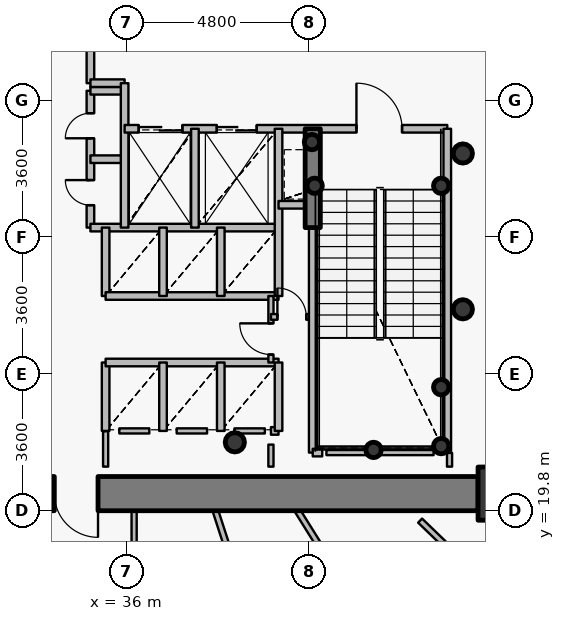
"""IFC4 building model, lengths in metres.
Left out: names, types, materials, properties, quantities, classifications, styles, units other than length and angle.
Written with IfcOpenShell. Run it as: python <this file> out.ifc"""

import sys

from ifc_helpers import new_model, si_unit, direction, frame, frame_2d, origin, origin_2d, place, context, subcontext, project, spatial, rectangle, hollow_circle, extrude, source, transform, mapped, element, fill, save


model = new_model("IFC4")
c1 = context("Model", 3, precision=1e-05, world=origin(), true_north=direction((0.0, 1.0)))
c2 = subcontext(c1, "Body", "Model", "MODEL_VIEW")
j1 = project(units=[si_unit("LENGTHUNIT", "METRE"), si_unit("PLANEANGLEUNIT", "RADIAN")], contexts=[c1])
p1 = place(None, origin())
s1 = spatial("IfcSite", under=j1, at=p1, CompositionType="ELEMENT")
p2 = place(p1, origin())
s2 = spatial("IfcBuilding", under=s1, at=p2, CompositionType="ELEMENT")
p3 = place(p2, frame((0.0, 0.0, 10.2)))
s3 = spatial("IfcBuildingStorey", under=s2, at=p3, CompositionType="ELEMENT", Elevation=10.2)
p4 = place(p3, frame((45.95, 20.25, 0.0), z_axis=(0.0, 0.0, 1.0), x_axis=(1.0, 0.0, 0.0)))
e1 = element("IfcColumn", 1, at=p4, inside=s3, PredefinedType="COLUMN", context=c2, shape_type="SweptSolid", body=[
    extrude(rectangle(XDim=1.4, YDim=1.4, at=origin_2d()), origin(), (0.0, 0.0, 1.0), 4.2),
])
p5 = place(p3, frame((38.85, 21.6, 0.0), z_axis=(0.0, 0.0, 1.0), x_axis=(1.0, 0.0, 0.0)))
e2 = element("IfcColumn", 2, at=p5, inside=s3, PredefinedType="COLUMN", context=c2, shape_type="SweptSolid", body=[
    extrude(hollow_circle(Radius=0.254, WallThickness=0.02, at=origin_2d()), origin(), (0.0, 0.0, 1.0), 4.2),
])
for number, where, z_axis, x_axis in (
    (3, (44.28, 21.5, 0.0), (0.0, 0.0, 1.0), (1.0, 0.0, 0.0)),
    (4, (44.28, 23.05, 0.0), (0.0, 0.0, 1.0), (1.0, 0.0, 0.0)),
    (5, (42.5, 21.4, 0.0), (0.0, 0.0, 1.0), (1.0, 0.0, 0.0)),
    (6, (40.95, 28.35, 0.0), (0.0, 0.0, 1.0), (1.0, 0.0, 0.0)),
    (7, (44.28, 28.35, 0.0), (0.0, 0.0, 1.0), (1.0, 0.0, 0.0)),
    (8, (40.88, 29.5, 0.0), (0.0, 0.0, 1.0), (1.0, 0.0, 0.0)),
):
    element("IfcColumn", number, at=place(p3, frame(where, z_axis=z_axis, x_axis=x_axis)), inside=s3, PredefinedType="COLUMN", context=c2, shape_type="SweptSolid", body=[
        extrude(hollow_circle(Radius=0.203, WallThickness=0.016, at=origin_2d()), origin(), (0.0, 0.0, 1.0), 4.2),
    ])
p6 = place(p3, frame((45.25, 20.25, 0.0), z_axis=(0.0, 0.0, 1.0), x_axis=(-1.0, 0.0, 0.0)))
e9 = element("IfcWall", 9, at=p6, inside=s3, PredefinedType="SHEAR", context=c2, shape_type="SweptSolid", body=[
    extrude(rectangle(XDim=18.5, YDim=0.9, at=frame_2d((9.25, 0.0))), origin(), (0.0, 0.0, 1.0), 3.35),
])
p7 = place(p6, frame((10.0, 0.0, 0.0)))
e10 = element("IfcOpeningElement", 10, at=p7, cuts=e9, PredefinedType="OPENING", context=c2, shape_type="SweptSolid", body=[
    extrude(rectangle(XDim=1.15, YDim=2.15, at=origin_2d()), frame((0.575, 0.46, 1.075), z_axis=(0.0, -1.0, 0.0), x_axis=(1.0, 0.0, 0.0)), (0.0, 0.0, 1.0), 0.92),
])
p8 = place(p3, frame((40.9, 27.25, 0.0), z_axis=(0.0, 0.0, 1.0), x_axis=(0.0, 1.0, 0.0)))
e11 = element("IfcWall", 11, at=p8, inside=s3, PredefinedType="SHEAR", context=c2, shape_type="SweptSolid", body=[
    extrude(rectangle(XDim=2.6, YDim=0.4, at=frame_2d((1.3, 0.0))), origin(), (0.0, 0.0, 1.0), 3.5),
])
for number, where, z_axis, x_axis in (
    (12, (44.85, 25.1, 0.0), (0.0, 0.0, 1.0), (1.0, 0.0, 0.0)),
    (13, (44.85, 29.2, 0.0), (0.0, 0.0, 1.0), (1.0, 0.0, 0.0)),
):
    element("IfcColumn", number, at=place(p3, frame(where, z_axis=z_axis, x_axis=x_axis)), inside=s3, PredefinedType="COLUMN", context=c2, shape_type="SweptSolid", body=[
        extrude(hollow_circle(Radius=0.254, WallThickness=0.02, at=origin_2d()), origin(), (0.0, 0.0, 1.0), 4.2),
    ])
p9 = place(p3, frame((35.05, 27.25, 0.0), z_axis=(0.0, 0.0, 1.0), x_axis=(0.0, 1.0, 0.0)))
e14 = element("IfcWall", 14, at=p9, inside=s3, PredefinedType="PARTITIONING", context=c2, shape_type="SweptSolid", body=[
    extrude(rectangle(XDim=3.6, YDim=0.2, at=frame_2d((1.8, 0.0))), origin(), (0.0, 0.0, 1.0), 3.9),
])
p10 = place(p9, frame((0.59, 0.0, 0.0)))
e15 = element("IfcOpeningElement", 15, at=p10, cuts=e14, PredefinedType="OPENING", context=c2, shape_type="SweptSolid", body=[
    extrude(rectangle(XDim=0.66, YDim=2.05, at=origin_2d()), frame((0.33, 0.11, 1.025), z_axis=(0.0, -1.0, 0.0), x_axis=(1.0, 0.0, 0.0)), (0.0, 0.0, 1.0), 0.22),
])
p11 = place(p9, frame((2.35, 0.0, 0.0)))
e16 = element("IfcOpeningElement", 16, at=p11, cuts=e14, PredefinedType="OPENING", context=c2, shape_type="SweptSolid", body=[
    extrude(rectangle(XDim=0.66, YDim=2.05, at=origin_2d()), frame((0.33, 0.11, 1.025), z_axis=(0.0, -1.0, 0.0), x_axis=(1.0, 0.0, 0.0)), (0.0, 0.0, 1.0), 0.22),
])
p12 = place(p3, frame((35.05, 27.25, 0.0), z_axis=(0.0, 0.0, 1.0), x_axis=(1.0, 0.0, 0.0)))
e17 = element("IfcWall", 17, at=p12, inside=s3, PredefinedType="PARTITIONING", context=c2, shape_type="SweptSolid", body=[
    extrude(rectangle(XDim=4.95, YDim=0.2, at=frame_2d((2.475, 0.0))), origin(), (0.0, 0.0, 1.0), 3.485),
])
for number, where, z_axis, x_axis in (
    (18, (35.05, 29.05, 0.0), (0.0, 0.0, 1.0), (1.0, 0.0, 0.0)),
    (19, (35.05, 30.85, 0.0), (0.0, 0.0, 1.0), (1.0, 0.0, 0.0)),
):
    element("IfcWall", number, at=place(p3, frame(where, z_axis=z_axis, x_axis=x_axis)), inside=s3, PredefinedType="PARTITIONING", context=c2, shape_type="SweptSolid", body=[
        extrude(rectangle(XDim=0.9, YDim=0.2, at=frame_2d((0.45, 0.0))), origin(), (0.0, 0.0, 1.0), 3.9),
    ])
p13 = place(p3, frame((35.05, 31.05, 0.0), z_axis=(0.0, 0.0, 1.0), x_axis=(0.0, 1.0, 0.0)))
e20 = element("IfcWall", 20, at=p13, inside=s3, PredefinedType="PARTITIONING", context=c2, shape_type="SweptSolid", body=[
    extrude(rectangle(XDim=2.25, YDim=0.2, at=frame_2d((1.125, 0.0))), origin(), (0.0, 0.0, 1.0), 3.485),
])
p14 = place(p3, frame((35.05, 31.05, 0.0), z_axis=(0.0, 0.0, 1.0), x_axis=(1.0, 0.0, 0.0)))
e21 = element("IfcWall", 21, at=p14, inside=s3, PredefinedType="PARTITIONING", context=c2, shape_type="SweptSolid", body=[
    extrude(rectangle(XDim=0.9, YDim=0.2, at=frame_2d((0.45, 0.0))), origin(), (0.0, 0.0, 1.0), 3.9),
])
p15 = place(p3, frame((35.45, 21.9, 0.0), z_axis=(0.0, 0.0, 1.0), x_axis=(0.0, 1.0, 0.0)))
e22 = element("IfcWall", 22, at=p15, inside=s3, PredefinedType="PARTITIONING", context=c2, shape_type="SweptSolid", body=[
    extrude(rectangle(XDim=1.8, YDim=0.2, at=frame_2d((0.9, 0.0))), origin(), (0.0, 0.0, 1.0), 3.9),
])
p16 = place(p3, frame((35.45, 23.7, 0.0), z_axis=(0.0, 0.0, 1.0), x_axis=(1.0, 0.0, 0.0)))
e23 = element("IfcWall", 23, at=p16, inside=s3, PredefinedType="PARTITIONING", context=c2, shape_type="SweptSolid", body=[
    extrude(rectangle(XDim=4.55, YDim=0.2, at=frame_2d((2.275, 0.0))), origin(), (0.0, 0.0, 1.0), 3.485),
])
p17 = place(p3, frame((35.45, 25.45, 0.0), z_axis=(0.0, 0.0, 1.0), x_axis=(0.0, 1.0, 0.0)))
e24 = element("IfcWall", 24, at=p17, inside=s3, PredefinedType="PARTITIONING", context=c2, shape_type="SweptSolid", body=[
    extrude(rectangle(XDim=1.8, YDim=0.2, at=frame_2d((0.9, 0.0))), origin(), (0.0, 0.0, 1.0), 3.9),
])
p18 = place(p3, frame((35.45, 25.45, 0.0), z_axis=(0.0, 0.0, 1.0), x_axis=(1.0, 0.0, 0.0)))
e25 = element("IfcWall", 25, at=p18, inside=s3, PredefinedType="PARTITIONING", context=c2, shape_type="SweptSolid", body=[
    extrude(rectangle(XDim=4.55, YDim=0.2, at=frame_2d((2.275, 0.0))), origin(), (0.0, 0.0, 1.0), 3.485),
])
p19 = place(p3, frame((35.95, 27.25, 0.0), z_axis=(0.0, 0.0, 1.0), x_axis=(0.0, 1.0, 0.0)))
e26 = element("IfcWall", 26, at=p19, inside=s3, PredefinedType="PARTITIONING", context=c2, shape_type="SweptSolid", body=[
    extrude(rectangle(XDim=3.8, YDim=0.2, at=frame_2d((1.9, 0.0))), origin(), (0.0, 0.0, 1.0), 3.9),
])
p20 = place(p3, frame((35.95, 29.85, 0.0), z_axis=(0.0, 0.0, 1.0), x_axis=(1.0, 0.0, 0.0)))
e27 = element("IfcWall", 27, at=p20, inside=s3, PredefinedType="PARTITIONING", context=c2, shape_type="SweptSolid", body=[
    extrude(rectangle(XDim=8.49, YDim=0.2, at=frame_2d((4.245, 0.0))), origin(), (0.0, 0.0, 1.0), 3.485),
])
p21 = place(p20, frame((6.1, 0.0, 0.0)))
e28 = element("IfcOpeningElement", 28, at=p21, cuts=e27, PredefinedType="OPENING", context=c2, shape_type="SweptSolid", body=[
    extrude(rectangle(XDim=1.2, YDim=2.15, at=origin_2d()), frame((0.6, 0.11, 1.075), z_axis=(0.0, -1.0, 0.0), x_axis=(1.0, 0.0, 0.0)), (0.0, 0.0, 1.0), 0.22),
])
p22 = place(p20, frame((0.37, 0.0, 0.0)))
e29 = element("IfcOpeningElement", 29, at=p22, cuts=e27, PredefinedType="OPENING", context=c2, shape_type="SweptSolid", body=[
    extrude(rectangle(XDim=1.15, YDim=2.15, at=origin_2d()), frame((0.575, 0.11, 1.075), z_axis=(0.0, -1.0, 0.0), x_axis=(1.0, 0.0, 0.0)), (0.0, 0.0, 1.0), 0.22),
])
p23 = place(p20, frame((2.425, 0.0, 0.0)))
e30 = element("IfcOpeningElement", 30, at=p23, cuts=e27, PredefinedType="OPENING", context=c2, shape_type="SweptSolid", body=[
    extrude(rectangle(XDim=1.05, YDim=2.15, at=origin_2d()), frame((0.525, 0.11, 1.075), z_axis=(0.0, -1.0, 0.0), x_axis=(1.0, 0.0, 0.0)), (0.0, 0.0, 1.0), 0.22),
])
p24 = place(p3, frame((36.2, 17.9, 0.0), z_axis=(0.0, 0.0, 1.0), x_axis=(0.0, 1.0, 0.0)))
e31 = element("IfcWall", 31, at=p24, inside=s3, PredefinedType="PARTITIONING", context=c2, shape_type="SweptSolid", body=[
    extrude(rectangle(XDim=1.9, YDim=0.135, at=frame_2d((0.95, 0.0))), origin(), (0.0, 0.0, 1.0), 3.085),
])
for number, where, z_axis, x_axis in (
    (32, (36.96, 21.9, 0.0), (0.0, 0.0, 1.0), (0.0, 1.0, 0.0)),
    (33, (36.96, 25.45, 0.0), (0.0, 0.0, 1.0), (0.0, 1.0, 0.0)),
):
    element("IfcWall", number, at=place(p3, frame(where, z_axis=z_axis, x_axis=x_axis)), inside=s3, PredefinedType="PARTITIONING", context=c2, shape_type="SweptSolid", body=[
        extrude(rectangle(XDim=1.8, YDim=0.2, at=frame_2d((0.9, 0.0))), origin(), (0.0, 0.0, 1.0), 3.9),
    ])
p25 = place(p3, frame((37.8, 27.25, 0.0), z_axis=(0.0, 0.0, 1.0), x_axis=(0.0, 1.0, 0.0)))
e34 = element("IfcWall", 34, at=p25, inside=s3, PredefinedType="PARTITIONING", context=c2, shape_type="SweptSolid", body=[
    extrude(rectangle(XDim=2.6, YDim=0.2, at=frame_2d((1.3, 0.0))), origin(), (0.0, 0.0, 1.0), 3.9),
])
p26 = place(p3, frame((38.339, 19.8, 0.0), z_axis=(0.0, 0.0, 1.0), x_axis=(0.309020911431, -0.951055243557, 0.0)))
e35 = element("IfcWall", 35, at=p26, inside=s3, PredefinedType="PARTITIONING", context=c2, shape_type="SweptSolid", body=[
    extrude(rectangle(XDim=18.723, YDim=0.15, at=frame_2d((9.362, 0.0))), origin(), (0.0, 0.0, 1.0), 3.285),
])
p27 = place(p26, frame((4.76, 0.0, 0.0)))
e36 = element("IfcOpeningElement", 36, at=p27, cuts=e35, PredefinedType="OPENING", context=c2, shape_type="SweptSolid", body=[
    extrude(rectangle(XDim=0.82, YDim=2.1, at=origin_2d()), frame((0.41, 0.085, 1.05), z_axis=(0.0, -1.0, 0.0), x_axis=(1.0, 0.0, 0.0)), (0.0, 0.0, 1.0), 0.17),
])
p28 = place(p26, frame((13.966, 0.0, 0.0)))
e37 = element("IfcOpeningElement", 37, at=p28, cuts=e35, PredefinedType="OPENING", context=c2, shape_type="SweptSolid", body=[
    extrude(rectangle(XDim=1.05, YDim=2.15, at=origin_2d()), frame((0.525, 0.085, 1.075), z_axis=(0.0, -1.0, 0.0), x_axis=(1.0, 0.0, 0.0)), (0.0, 0.0, 1.0), 0.17),
])
for number, where, z_axis, x_axis in (
    (38, (38.48, 21.9, 0.0), (0.0, 0.0, 1.0), (0.0, 1.0, 0.0)),
    (39, (38.48, 25.45, 0.0), (0.0, 0.0, 1.0), (0.0, 1.0, 0.0)),
):
    element("IfcWall", number, at=place(p3, frame(where, z_axis=z_axis, x_axis=x_axis)), inside=s3, PredefinedType="PARTITIONING", context=c2, shape_type="SweptSolid", body=[
        extrude(rectangle(XDim=1.8, YDim=0.2, at=frame_2d((0.9, 0.0))), origin(), (0.0, 0.0, 1.0), 3.9),
    ])
p29 = place(p3, frame((39.8, 21.9, 0.0), z_axis=(0.0, 0.0, 1.0), x_axis=(1.0, 0.0, 0.0)))
e40 = element("IfcWall", 40, at=p29, inside=s3, PredefinedType="PARTITIONING", context=c2, shape_type="SweptSolid", body=[
    extrude(rectangle(XDim=0.2, YDim=0.2, at=frame_2d((0.1, 0.0))), origin(), (0.0, 0.0, 1.0), 3.9),
])
p30 = place(p3, frame((39.8, 23.7, 0.0), z_axis=(0.0, 0.0, 1.0), x_axis=(0.0, 1.0, 0.0)))
e41 = element("IfcWall", 41, at=p30, inside=s3, PredefinedType="PARTITIONING", context=c2, shape_type="SweptSolid", body=[
    extrude(rectangle(XDim=1.75, YDim=0.135, at=frame_2d((0.875, 0.0))), origin(), (0.0, 0.0, 1.0), 3.9),
])
p31 = place(p30, frame((0.21, 0.0, 0.0)))
e42 = element("IfcOpeningElement", 42, at=p31, cuts=e41, PredefinedType="OPENING", context=c2, shape_type="SweptSolid", body=[
    extrude(rectangle(XDim=0.82, YDim=2.1, at=origin_2d()), frame((0.41, 0.078, 1.05), z_axis=(0.0, -1.0, 0.0), x_axis=(1.0, 0.0, 0.0)), (0.0, 0.0, 1.0), 0.155),
])
p32 = place(p3, frame((39.8, 24.9, 0.0), z_axis=(0.0, 0.0, 1.0), x_axis=(1.0, 0.0, 0.0)))
e43 = element("IfcWall", 43, at=p32, inside=s3, PredefinedType="PARTITIONING", context=c2, shape_type="SweptSolid", body=[
    extrude(rectangle(XDim=1.1, YDim=0.15, at=frame_2d((0.55, 0.0))), origin(), (0.0, 0.0, 1.0), 3.9),
])
p33 = place(p32, frame((0.17, 0.0, 0.0)))
e44 = element("IfcOpeningElement", 44, at=p33, cuts=e43, PredefinedType="OPENING", context=c2, shape_type="SweptSolid", body=[
    extrude(rectangle(XDim=0.76, YDim=2.1, at=origin_2d()), frame((0.38, 0.085, 1.05), z_axis=(0.0, -1.0, 0.0), x_axis=(1.0, 0.0, 0.0)), (0.0, 0.0, 1.0), 0.17),
])
p34 = place(p3, frame((40.0, 21.9, 0.0), z_axis=(0.0, 0.0, 1.0), x_axis=(0.0, 1.0, 0.0)))
e45 = element("IfcWall", 45, at=p34, inside=s3, PredefinedType="PARTITIONING", context=c2, shape_type="SweptSolid", body=[
    extrude(rectangle(XDim=1.8, YDim=0.2, at=frame_2d((0.9, 0.0))), origin(), (0.0, 0.0, 1.0), 3.9),
])
p35 = place(p3, frame((40.0, 25.45, 0.0), z_axis=(0.0, 0.0, 1.0), x_axis=(0.0, 1.0, 0.0)))
e46 = element("IfcWall", 46, at=p35, inside=s3, PredefinedType="PARTITIONING", context=c2, shape_type="SweptSolid", body=[
    extrude(rectangle(XDim=4.4, YDim=0.2, at=frame_2d((2.2, 0.0))), origin(), (0.0, 0.0, 1.0), 3.9),
])
p36 = place(p3, frame((40.0, 27.85, 0.0), z_axis=(0.0, 0.0, 1.0), x_axis=(1.0, 0.0, 0.0)))
e47 = element("IfcWall", 47, at=p36, inside=s3, PredefinedType="PARTITIONING", context=c2, shape_type="SweptSolid", body=[
    extrude(rectangle(XDim=0.9, YDim=0.2, at=frame_2d((0.45, 0.0))), origin(), (0.0, 0.0, 1.0), 3.9),
])
p37 = place(p3, frame((40.499, 19.8, 0.0), z_axis=(0.0, 0.0, 1.0), x_axis=(0.529919953547, -0.848047665425, 0.0)))
e48 = element("IfcWall", 48, at=p37, inside=s3, PredefinedType="PARTITIONING", context=c2, shape_type="SweptSolid", body=[
    extrude(rectangle(XDim=18.893, YDim=0.15, at=frame_2d((9.447, 0.0))), origin(), (0.0, 0.0, 1.0), 3.285),
])
p38 = place(p37, frame((13.906, 0.0, 0.0)))
e49 = element("IfcOpeningElement", 49, at=p38, cuts=e48, PredefinedType="OPENING", context=c2, shape_type="SweptSolid", body=[
    extrude(rectangle(XDim=1.05, YDim=2.15, at=origin_2d()), frame((0.525, 0.085, 1.075), z_axis=(0.0, -1.0, 0.0), x_axis=(1.0, 0.0, 0.0)), (0.0, 0.0, 1.0), 0.17),
])
p39 = place(p3, frame((40.9, 21.33, 0.0), z_axis=(0.0, 0.0, 1.0), x_axis=(0.0, 1.0, 0.0)))
e50 = element("IfcWall", 50, at=p39, inside=s3, PredefinedType="PARTITIONING", context=c2, shape_type="SweptSolid", body=[
    extrude(rectangle(XDim=5.91, YDim=0.2, at=frame_2d((2.955, 0.0))), origin(), (0.0, 0.0, 1.0), 3.435),
])
p40 = place(p3, frame((40.9, 21.33, 0.0), z_axis=(0.0, 0.0, 1.0), x_axis=(1.0, 0.0, 0.0)))
e51 = element("IfcWall", 51, at=p40, inside=s3, PredefinedType="PARTITIONING", context=c2, shape_type="SweptSolid", body=[
    extrude(rectangle(XDim=0.25, YDim=0.2, at=frame_2d((0.125, 0.0))), origin(), (0.0, 0.0, 1.0), 3.435),
])
p41 = place(p3, frame((44.44, 21.33, 0.0), z_axis=(0.0, 0.0, 1.0), x_axis=(0.0, 1.0, 0.0)))
e52 = element("IfcWall", 52, at=p41, inside=s3, PredefinedType="PARTITIONING", context=c2, shape_type="SweptSolid", body=[
    extrude(rectangle(XDim=8.52, YDim=0.2, at=frame_2d((4.26, 0.0))), origin(), (0.0, 0.0, 1.0), 3.9),
])
p42 = place(p3, frame((44.08, 21.33, 0.0), z_axis=(0.0, 0.0, 1.0), x_axis=(-1.0, 0.0, 0.0)))
e53 = element("IfcWall", 53, at=p42, inside=s3, PredefinedType="PARTITIONING", context=c2, shape_type="SweptSolid", body=[
    extrude(rectangle(XDim=2.82, YDim=0.135, at=frame_2d((1.41, 0.0))), origin(), (0.0, 0.0, 1.0), 3.435),
])
p43 = place(p3, frame((36.6, 21.9, 0.0), z_axis=(0.0, 0.0, 1.0), x_axis=(-1.0, 0.0, 0.0)))
e54 = element("IfcWall", 54, at=p43, inside=s3, PredefinedType="PARTITIONING", context=c2, shape_type="SweptSolid", body=[
    extrude(rectangle(XDim=0.79, YDim=0.135, at=frame_2d((0.395, 0.0))), origin(), (0.0, 0.0, 1.0), 3.9),
])
p44 = place(p3, frame((38.12, 21.9, 0.0), z_axis=(0.0, 0.0, 1.0), x_axis=(-1.0, 0.0, 0.0)))
e55 = element("IfcWall", 55, at=p44, inside=s3, PredefinedType="PARTITIONING", context=c2, shape_type="SweptSolid", body=[
    extrude(rectangle(XDim=0.8, YDim=0.135, at=frame_2d((0.4, 0.0))), origin(), (0.0, 0.0, 1.0), 3.9),
])
p45 = place(p3, frame((39.64, 21.9, 0.0), z_axis=(0.0, 0.0, 1.0), x_axis=(-1.0, 0.0, 0.0)))
e56 = element("IfcWall", 56, at=p45, inside=s3, PredefinedType="PARTITIONING", context=c2, shape_type="SweptSolid", body=[
    extrude(rectangle(XDim=0.8, YDim=0.135, at=frame_2d((0.4, 0.0))), origin(), (0.0, 0.0, 1.0), 3.485),
])
p46 = place(p3, frame((39.8, 20.96, 0.0), z_axis=(0.0, 0.0, 1.0), x_axis=(0.0, 1.0, 0.0)))
e57 = element("IfcWall", 57, at=p46, inside=s3, PredefinedType="PARTITIONING", context=c2, shape_type="SweptSolid", body=[
    extrude(rectangle(XDim=0.58, YDim=0.135, at=frame_2d((0.29, 0.0))), origin(), (0.0, 0.0, 1.0), 3.435),
])
p47 = place(p3, frame((44.5, 20.96, 0.0), z_axis=(0.0, 0.0, 1.0), x_axis=(0.0, 1.0, 0.0)))
e58 = element("IfcWall", 58, at=p47, inside=s3, PredefinedType="PARTITIONING", context=c2, shape_type="SweptSolid", body=[
    extrude(rectangle(XDim=0.36, YDim=0.135, at=frame_2d((0.18, 0.0))), origin(), (0.0, 0.0, 1.0), 3.9),
])
p48 = place(p3, frame((35.45, 21.89, 0.0), z_axis=(0.0, 0.0, 1.0), x_axis=(0.0, -1.0, 0.0)))
e59 = element("IfcWall", 59, at=p48, inside=s3, PredefinedType="PARTITIONING", context=c2, shape_type="SweptSolid", body=[
    extrude(rectangle(XDim=0.93, YDim=0.135, at=frame_2d((0.465, 0.0))), origin(), (0.0, 0.0, 1.0), 3.485),
])
p49 = place(p3, frame((43.725, 19.54, 0.0), z_axis=(0.0, 0.0, 1.0), x_axis=(0.719317456081, -0.69468150787, 0.0)))
e60 = element("IfcWall", 60, at=p49, inside=s3, PredefinedType="PARTITIONING", context=c2, shape_type="SweptSolid", body=[
    extrude(rectangle(XDim=2.804, YDim=0.15, at=frame_2d((1.402, 0.0))), origin(), (0.0, 0.0, 1.0), 3.9),
])
m1 = source(origin(), c2, "Body", "SweptSolid", [
    extrude(rectangle(XDim=1.15, YDim=2.15, at=origin_2d()), frame((0.575, 0.025, 1.075), z_axis=(0.0, -1.0, 0.0), x_axis=(1.0, 0.0, 0.0)), (0.0, 0.0, 1.0), 0.05),
])
p50 = place(p7, origin())
e61 = element("IfcDoor", 61, at=p50, inside=s3, OperationType="SINGLE_SWING_LEFT", PredefinedType="DOOR", context=c2, shape_type="MappedRepresentation", body=[
    mapped(m1, transform((0.0, 0.0, 0.0), x_axis=(1.0, 0.0, 0.0), y_axis=(0.0, 1.0, 0.0), z_axis=(0.0, 0.0, 1.0), scale=1.0)),
])
fill(e10, e61)
m2 = source(origin(), c2, "Body", "SweptSolid", [
    extrude(rectangle(XDim=1.2, YDim=2.15, at=origin_2d()), frame((0.6, 0.025, 1.075), z_axis=(0.0, -1.0, 0.0), x_axis=(1.0, 0.0, 0.0)), (0.0, 0.0, 1.0), 0.05),
])
p51 = place(p21, origin())
e62 = element("IfcDoor", 62, at=p51, inside=s3, OperationType="SINGLE_SWING_LEFT", PredefinedType="DOOR", context=c2, shape_type="MappedRepresentation", body=[
    mapped(m2, transform((0.0, 0.0, 0.0), x_axis=(1.0, 0.0, 0.0), y_axis=(0.0, 1.0, 0.0), z_axis=(0.0, 0.0, 1.0), scale=1.0)),
])
fill(e28, e62)
m3 = source(origin(), c2, "Body", "SweptSolid", [
    extrude(rectangle(XDim=1.15, YDim=2.15, at=origin_2d()), frame((0.575, 0.025, 1.075), z_axis=(0.0, -1.0, 0.0), x_axis=(1.0, 0.0, 0.0)), (0.0, 0.0, 1.0), 0.05),
])
p52 = place(p22, origin())
e63 = element("IfcDoor", 63, at=p52, inside=s3, OperationType="DOUBLE_DOOR_SLIDING", PredefinedType="USERDEFINED", context=c2, shape_type="MappedRepresentation", body=[
    mapped(m3, transform((0.0, 0.0, 0.0), x_axis=(1.0, 0.0, 0.0), y_axis=(0.0, 1.0, 0.0), z_axis=(0.0, 0.0, 1.0), scale=1.0)),
])
fill(e29, e63)
m4 = source(origin(), c2, "Body", "SweptSolid", [
    extrude(rectangle(XDim=1.05, YDim=2.15, at=origin_2d()), frame((0.525, 0.025, 1.075), z_axis=(0.0, -1.0, 0.0), x_axis=(1.0, 0.0, 0.0)), (0.0, 0.0, 1.0), 0.05),
])
p53 = place(p23, origin())
e64 = element("IfcDoor", 64, at=p53, inside=s3, OperationType="DOUBLE_DOOR_SLIDING", PredefinedType="USERDEFINED", context=c2, shape_type="MappedRepresentation", body=[
    mapped(m4, transform((0.0, 0.0, 0.0), x_axis=(1.0, 0.0, 0.0), y_axis=(0.0, 1.0, 0.0), z_axis=(0.0, 0.0, 1.0), scale=1.0)),
])
fill(e30, e64)
m5 = source(origin(), c2, "Body", "SweptSolid", [
    extrude(rectangle(XDim=0.66, YDim=2.05, at=origin_2d()), frame((0.33, 0.025, 1.025), z_axis=(0.0, -1.0, 0.0), x_axis=(1.0, 0.0, 0.0)), (0.0, 0.0, 1.0), 0.05),
])
p54 = place(p10, origin())
e65 = element("IfcDoor", 65, at=p54, inside=s3, OperationType="SINGLE_SWING_RIGHT", PredefinedType="USERDEFINED", context=c2, shape_type="MappedRepresentation", body=[
    mapped(m5, transform((0.0, 0.0, 0.0), x_axis=(1.0, 0.0, 0.0), y_axis=(0.0, 1.0, 0.0), z_axis=(0.0, 0.0, 1.0), scale=1.0)),
])
fill(e15, e65)
p55 = place(p11, origin())
e66 = element("IfcDoor", 66, at=p55, inside=s3, OperationType="SINGLE_SWING_LEFT", PredefinedType="USERDEFINED", context=c2, shape_type="MappedRepresentation", body=[
    mapped(m5, transform((0.0, 0.0, 0.0), x_axis=(1.0, 0.0, 0.0), y_axis=(0.0, 1.0, 0.0), z_axis=(0.0, 0.0, 1.0), scale=1.0)),
])
fill(e16, e66)
m6 = source(origin(), c2, "Body", "SweptSolid", [
    extrude(rectangle(XDim=0.82, YDim=2.1, at=origin_2d()), frame((0.41, 0.025, 1.05), z_axis=(0.0, -1.0, 0.0), x_axis=(1.0, 0.0, 0.0)), (0.0, 0.0, 1.0), 0.05),
])
p56 = place(p31, origin())
e67 = element("IfcDoor", 67, at=p56, inside=s3, OperationType="SINGLE_SWING_RIGHT", PredefinedType="DOOR", context=c2, shape_type="MappedRepresentation", body=[
    mapped(m6, transform((0.0, 0.0, 0.0), x_axis=(1.0, 0.0, 0.0), y_axis=(0.0, 1.0, 0.0), z_axis=(0.0, 0.0, 1.0), scale=1.0)),
])
fill(e42, e67)
m7 = source(origin(), c2, "Body", "SweptSolid", [
    extrude(rectangle(XDim=0.76, YDim=2.1, at=origin_2d()), frame((0.38, 0.025, 1.05), z_axis=(0.0, -1.0, 0.0), x_axis=(1.0, 0.0, 0.0)), (0.0, 0.0, 1.0), 0.05),
])
p57 = place(p33, origin())
e68 = element("IfcDoor", 68, at=p57, inside=s3, OperationType="SINGLE_SWING_LEFT", PredefinedType="DOOR", context=c2, shape_type="MappedRepresentation", body=[
    mapped(m7, transform((0.0, 0.0, 0.0), x_axis=(1.0, 0.0, 0.0), y_axis=(0.0, 1.0, 0.0), z_axis=(0.0, 0.0, 1.0), scale=1.0)),
])
fill(e44, e68)
save(model, sys.argv[1])
